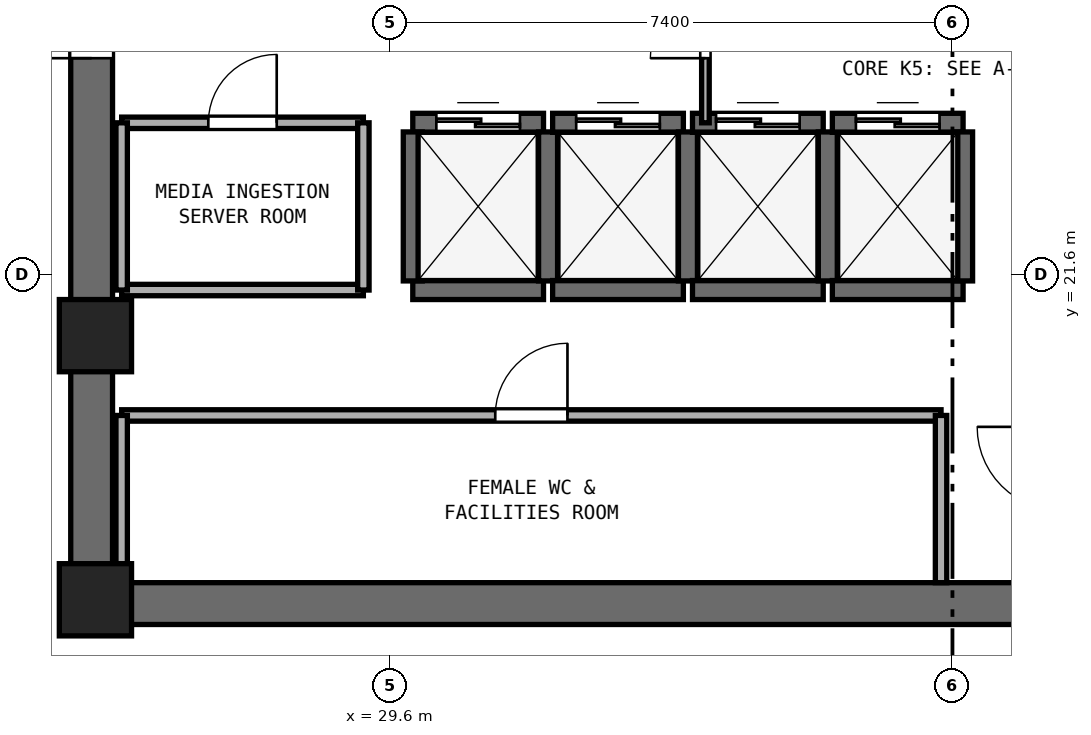
"""IFC4 building model, lengths in metres.
Left out: names, types, materials, properties, quantities, classifications, styles, units other than length and angle.
Written with IfcOpenShell. Run it as: python <this file> out.ifc"""

import sys

from ifc_helpers import new_model, si_unit, direction, frame, frame_2d, origin, origin_2d, place, context, subcontext, project, spatial, rectangle, extrude, element, fill, save


model = new_model("IFC4")
c1 = context("Model", 3, precision=1e-05, world=origin(), true_north=direction((0.0, 1.0)))
c2 = subcontext(c1, "Body", "Model", "MODEL_VIEW")
j1 = project(units=[si_unit("LENGTHUNIT", "METRE"), si_unit("PLANEANGLEUNIT", "RADIAN")], contexts=[c1])
p1 = place(None, origin())
s1 = spatial("IfcSite", under=j1, at=p1, CompositionType="ELEMENT")
p2 = place(p1, origin())
s2 = spatial("IfcBuilding", under=s1, at=p2, CompositionType="ELEMENT")
p3 = place(p2, frame((0.0, 0.0, 151.6)))
s3 = spatial("IfcBuildingStorey", under=s2, at=p3, CompositionType="ELEMENT", Elevation=151.6)
p4 = place(p3, frame((25.4, 17.275, 0.0), z_axis=(0.0, 0.0, 1.0), x_axis=(1.0, 0.0, 0.0)))
e1 = element("IfcWall", 1, at=p4, inside=s3, PredefinedType="SHEAR", context=c2, shape_type="SweptSolid", body=[
    extrude(rectangle(XDim=23.2, YDim=0.55, at=frame_2d((11.6, 0.0))), origin(), (0.0, 0.0, 1.0), 3.54),
])
p5 = place(p3, frame((25.675, 17.55, 0.0), z_axis=(0.0, 0.0, 1.0), x_axis=(0.0, 1.0, 0.0)))
e2 = element("IfcWall", 2, at=p5, inside=s3, PredefinedType="SHEAR", context=c2, shape_type="SweptSolid", body=[
    extrude(rectangle(XDim=15.3, YDim=0.55, at=frame_2d((7.65, 0.0))), origin(), (0.0, 0.0, 1.0), 3.54),
])
p6 = place(p5, frame((6.9, 0.0, 0.0)))
e3 = element("IfcOpeningElement", 3, at=p6, cuts=e2, PredefinedType="OPENING", context=c2, shape_type="SweptSolid", body=[
    extrude(rectangle(XDim=1.5, YDim=2.15, at=frame_2d((0.75, 1.075))), frame((0.0, 0.285, 0.0), z_axis=(0.0, -1.0, 0.0), x_axis=(1.0, 0.0, 0.0)), (0.0, 0.0, 1.0), 0.57),
])
for number, where, z_axis, x_axis in (
    (4, (25.725, 17.325, 0.0), (0.0, 0.0, 1.0), (1.0, 0.0, 0.0)),
    (5, (25.725, 20.8, 0.0), (0.0, 0.0, 1.0), (1.0, 0.0, 0.0)),
):
    element("IfcColumn", number, at=place(p3, frame(where, z_axis=z_axis, x_axis=x_axis)), inside=s3, PredefinedType="PILASTER", context=c2, shape_type="SweptSolid", body=[
        extrude(rectangle(XDim=0.95, YDim=0.95, at=origin_2d()), origin(), (0.0, 0.0, 1.0), 3.8),
    ])
p7 = place(p3, frame((29.9, 21.4, 0.0), z_axis=(0.0, 0.0, 1.0), x_axis=(1.0, 0.0, 0.0)))
e6 = element("IfcWall", 6, at=p7, inside=s3, PredefinedType="SHEAR", context=c2, shape_type="SweptSolid", body=[
    extrude(rectangle(XDim=1.72, YDim=0.25, at=frame_2d((0.86, 0.0))), origin(), (0.0, 0.0, 1.0), 3.54),
])
p8 = place(p3, frame((29.9, 23.6, 0.0), z_axis=(0.0, 0.0, 1.0), x_axis=(1.0, 0.0, 0.0)))
e7 = element("IfcWall", 7, at=p8, inside=s3, PredefinedType="SHEAR", context=c2, shape_type="SweptSolid", body=[
    extrude(rectangle(XDim=1.72, YDim=0.25, at=frame_2d((0.86, 0.0))), origin(), (0.0, 0.0, 1.0), 3.54),
])
p9 = place(p8, frame((0.31, 0.0, 0.0)))
e8 = element("IfcOpeningElement", 8, at=p9, cuts=e7, PredefinedType="OPENING", context=c2, shape_type="SweptSolid", body=[
    extrude(rectangle(XDim=1.1, YDim=2.15, at=frame_2d((0.55, 1.075))), frame((0.0, 0.135, 0.0), z_axis=(0.0, -1.0, 0.0), x_axis=(1.0, 0.0, 0.0)), (0.0, 0.0, 1.0), 0.27),
])
for number, where, z_axis, x_axis in (
    (9, (29.9, 21.52, 0.0), (0.0, 0.0, 1.0), (0.0, 1.0, 0.0)),
    (10, (31.68, 21.52, 0.0), (0.0, 0.0, 1.0), (0.0, 1.0, 0.0)),
):
    element("IfcWall", number, at=place(p3, frame(where, z_axis=z_axis, x_axis=x_axis)), inside=s3, PredefinedType="SHEAR", context=c2, shape_type="SweptSolid", body=[
        extrude(rectangle(XDim=1.96, YDim=0.25, at=frame_2d((0.98, 0.0))), origin(), (0.0, 0.0, 1.0), 3.54),
    ])
p10 = place(p3, frame((31.74, 21.4, 0.0), z_axis=(0.0, 0.0, 1.0), x_axis=(1.0, 0.0, 0.0)))
e11 = element("IfcWall", 11, at=p10, inside=s3, PredefinedType="SHEAR", context=c2, shape_type="SweptSolid", body=[
    extrude(rectangle(XDim=1.72, YDim=0.25, at=frame_2d((0.86, 0.0))), origin(), (0.0, 0.0, 1.0), 3.54),
])
p11 = place(p3, frame((31.74, 23.6, 0.0), z_axis=(0.0, 0.0, 1.0), x_axis=(1.0, 0.0, 0.0)))
e12 = element("IfcWall", 12, at=p11, inside=s3, PredefinedType="SHEAR", context=c2, shape_type="SweptSolid", body=[
    extrude(rectangle(XDim=1.72, YDim=0.25, at=frame_2d((0.86, 0.0))), origin(), (0.0, 0.0, 1.0), 3.54),
])
p12 = place(p11, frame((0.31, 0.0, 0.0)))
e13 = element("IfcOpeningElement", 13, at=p12, cuts=e12, PredefinedType="OPENING", context=c2, shape_type="SweptSolid", body=[
    extrude(rectangle(XDim=1.1, YDim=2.15, at=frame_2d((0.55, 1.075))), frame((0.0, 0.135, 0.0), z_axis=(0.0, -1.0, 0.0), x_axis=(1.0, 0.0, 0.0)), (0.0, 0.0, 1.0), 0.27),
])
p13 = place(p3, frame((33.52, 21.52, 0.0), z_axis=(0.0, 0.0, 1.0), x_axis=(0.0, 1.0, 0.0)))
e14 = element("IfcWall", 14, at=p13, inside=s3, PredefinedType="SHEAR", context=c2, shape_type="SweptSolid", body=[
    extrude(rectangle(XDim=1.96, YDim=0.25, at=frame_2d((0.98, 0.0))), origin(), (0.0, 0.0, 1.0), 3.54),
])
p14 = place(p3, frame((33.58, 21.4, 0.0), z_axis=(0.0, 0.0, 1.0), x_axis=(1.0, 0.0, 0.0)))
e15 = element("IfcWall", 15, at=p14, inside=s3, PredefinedType="SHEAR", context=c2, shape_type="SweptSolid", body=[
    extrude(rectangle(XDim=1.72, YDim=0.25, at=frame_2d((0.86, 0.0))), origin(), (0.0, 0.0, 1.0), 3.54),
])
p15 = place(p3, frame((33.58, 23.6, 0.0), z_axis=(0.0, 0.0, 1.0), x_axis=(1.0, 0.0, 0.0)))
e16 = element("IfcWall", 16, at=p15, inside=s3, PredefinedType="SHEAR", context=c2, shape_type="SweptSolid", body=[
    extrude(rectangle(XDim=1.72, YDim=0.25, at=frame_2d((0.86, 0.0))), origin(), (0.0, 0.0, 1.0), 3.54),
])
p16 = place(p15, frame((0.31, 0.0, 0.0)))
e17 = element("IfcOpeningElement", 17, at=p16, cuts=e16, PredefinedType="OPENING", context=c2, shape_type="SweptSolid", body=[
    extrude(rectangle(XDim=1.1, YDim=2.15, at=frame_2d((0.55, 1.075))), frame((0.0, 0.135, 0.0), z_axis=(0.0, -1.0, 0.0), x_axis=(1.0, 0.0, 0.0)), (0.0, 0.0, 1.0), 0.27),
])
p17 = place(p3, frame((35.36, 21.52, 0.0), z_axis=(0.0, 0.0, 1.0), x_axis=(0.0, 1.0, 0.0)))
e18 = element("IfcWall", 18, at=p17, inside=s3, PredefinedType="SHEAR", context=c2, shape_type="SweptSolid", body=[
    extrude(rectangle(XDim=1.96, YDim=0.25, at=frame_2d((0.98, 0.0))), origin(), (0.0, 0.0, 1.0), 3.54),
])
p18 = place(p3, frame((35.42, 21.4, 0.0), z_axis=(0.0, 0.0, 1.0), x_axis=(1.0, 0.0, 0.0)))
e19 = element("IfcWall", 19, at=p18, inside=s3, PredefinedType="SHEAR", context=c2, shape_type="SweptSolid", body=[
    extrude(rectangle(XDim=1.72, YDim=0.25, at=frame_2d((0.86, 0.0))), origin(), (0.0, 0.0, 1.0), 3.54),
])
p19 = place(p3, frame((35.42, 23.6, 0.0), z_axis=(0.0, 0.0, 1.0), x_axis=(1.0, 0.0, 0.0)))
e20 = element("IfcWall", 20, at=p19, inside=s3, PredefinedType="SHEAR", context=c2, shape_type="SweptSolid", body=[
    extrude(rectangle(XDim=1.72, YDim=0.25, at=frame_2d((0.86, 0.0))), origin(), (0.0, 0.0, 1.0), 3.54),
])
p20 = place(p19, frame((0.31, 0.0, 0.0)))
e21 = element("IfcOpeningElement", 21, at=p20, cuts=e20, PredefinedType="OPENING", context=c2, shape_type="SweptSolid", body=[
    extrude(rectangle(XDim=1.1, YDim=2.15, at=frame_2d((0.55, 1.075))), frame((0.0, 0.135, 0.0), z_axis=(0.0, -1.0, 0.0), x_axis=(1.0, 0.0, 0.0)), (0.0, 0.0, 1.0), 0.27),
])
p21 = place(p3, frame((37.14, 21.52, 0.0), z_axis=(0.0, 0.0, 1.0), x_axis=(0.0, 1.0, 0.0)))
e22 = element("IfcWall", 22, at=p21, inside=s3, PredefinedType="SHEAR", context=c2, shape_type="SweptSolid", body=[
    extrude(rectangle(XDim=1.96, YDim=0.25, at=frame_2d((0.98, 0.0))), origin(), (0.0, 0.0, 1.0), 3.54),
])
p22 = place(p3, frame((26.07, 19.75, 0.0), z_axis=(0.0, 0.0, 1.0), x_axis=(1.0, 0.0, 0.0)))
e23 = element("IfcWall", 23, at=p22, inside=s3, PredefinedType="PARTITIONING", context=c2, shape_type="SweptSolid", body=[
    extrude(rectangle(XDim=10.78, YDim=0.15, at=frame_2d((5.39, 0.0))), origin(), (0.0, 0.0, 1.0), 3.54),
])
p23 = place(p22, frame((4.915, 0.0, 0.0)))
e24 = element("IfcOpeningElement", 24, at=p23, cuts=e23, PredefinedType="OPENING", context=c2, shape_type="SweptSolid", body=[
    extrude(rectangle(XDim=0.95, YDim=2.1, at=frame_2d((0.475, 1.05))), frame((0.0, 0.085, 0.0), z_axis=(0.0, -1.0, 0.0), x_axis=(1.0, 0.0, 0.0)), (0.0, 0.0, 1.0), 0.17),
])
p24 = place(p3, frame((26.07, 17.55, 0.0), z_axis=(0.0, 0.0, 1.0), x_axis=(0.0, 1.0, 0.0)))
e25 = element("IfcWall", 25, at=p24, inside=s3, PredefinedType="PARTITIONING", context=c2, shape_type="SweptSolid", body=[
    extrude(rectangle(XDim=2.2, YDim=0.15, at=frame_2d((1.1, 0.0))), origin(), (0.0, 0.0, 1.0), 2.64),
])
p25 = place(p3, frame((36.85, 17.55, 0.0), z_axis=(0.0, 0.0, 1.0), x_axis=(0.0, 1.0, 0.0)))
e26 = element("IfcWall", 26, at=p25, inside=s3, PredefinedType="PARTITIONING", context=c2, shape_type="SweptSolid", body=[
    extrude(rectangle(XDim=2.2, YDim=0.15, at=frame_2d((1.1, 0.0))), origin(), (0.0, 0.0, 1.0), 3.54),
])
p26 = place(p3, frame((26.07, 21.4, 0.0), z_axis=(0.0, 0.0, 1.0), x_axis=(1.0, 0.0, 0.0)))
e27 = element("IfcWall", 27, at=p26, inside=s3, PredefinedType="PARTITIONING", context=c2, shape_type="SweptSolid", body=[
    extrude(rectangle(XDim=3.18, YDim=0.15, at=frame_2d((1.59, 0.0))), origin(), (0.0, 0.0, 1.0), 3.54),
])
p27 = place(p3, frame((26.07, 23.6, 0.0), z_axis=(0.0, 0.0, 1.0), x_axis=(1.0, 0.0, 0.0)))
e28 = element("IfcWall", 28, at=p27, inside=s3, PredefinedType="PARTITIONING", context=c2, shape_type="SweptSolid", body=[
    extrude(rectangle(XDim=3.18, YDim=0.15, at=frame_2d((1.59, 0.0))), origin(), (0.0, 0.0, 1.0), 3.54),
])
p28 = place(p27, frame((1.14, 0.0, 0.0)))
e29 = element("IfcOpeningElement", 29, at=p28, cuts=e28, PredefinedType="OPENING", context=c2, shape_type="SweptSolid", body=[
    extrude(rectangle(XDim=0.9, YDim=2.1, at=frame_2d((0.45, 1.05))), frame((0.0, 0.085, 0.0), z_axis=(0.0, -1.0, 0.0), x_axis=(1.0, 0.0, 0.0)), (0.0, 0.0, 1.0), 0.17),
])
p29 = place(p3, frame((26.07, 21.4, 0.0), z_axis=(0.0, 0.0, 1.0), x_axis=(0.0, 1.0, 0.0)))
e30 = element("IfcWall", 30, at=p29, inside=s3, PredefinedType="PARTITIONING", context=c2, shape_type="SweptSolid", body=[
    extrude(rectangle(XDim=2.2, YDim=0.15, at=frame_2d((1.1, 0.0))), origin(), (0.0, 0.0, 1.0), 2.64),
])
p30 = place(p3, frame((29.25, 21.4, 0.0), z_axis=(0.0, 0.0, 1.0), x_axis=(0.0, 1.0, 0.0)))
e31 = element("IfcWall", 31, at=p30, inside=s3, PredefinedType="PARTITIONING", context=c2, shape_type="SweptSolid", body=[
    extrude(rectangle(XDim=2.2, YDim=0.15, at=frame_2d((1.1, 0.0))), origin(), (0.0, 0.0, 1.0), 3.54),
])
p31 = place(p3, frame((33.75, 23.6, 0.0), z_axis=(0.0, 0.0, 1.0), x_axis=(0.0, 1.0, 0.0)))
e32 = element("IfcWall", 32, at=p31, inside=s3, PredefinedType="PARTITIONING", context=c2, shape_type="SweptSolid", body=[
    extrude(rectangle(XDim=3.2, YDim=0.1, at=frame_2d((1.6, 0.0))), origin(), (0.0, 0.0, 1.0), 3.54),
])
p32 = place(p31, frame((0.85, 0.0, 0.0)))
e33 = element("IfcOpeningElement", 33, at=p32, cuts=e32, PredefinedType="OPENING", context=c2, shape_type="SweptSolid", body=[
    extrude(rectangle(XDim=1.45, YDim=2.12, at=frame_2d((0.725, 1.06))), frame((0.0, 0.06, 0.0), z_axis=(0.0, -1.0, 0.0), x_axis=(1.0, 0.0, 0.0)), (0.0, 0.0, 1.0), 0.12),
])
p33 = place(p9, origin())
e34 = element("IfcDoor", 34, at=p33, inside=s3, OperationType="DOUBLE_DOOR_SLIDING", PredefinedType="DOOR", context=c2, shape_type="SweptSolid", body=[
    extrude(rectangle(XDim=1.1, YDim=2.15, at=frame_2d((0.55, 1.075))), frame((0.0, 0.025, 0.0), z_axis=(0.0, -1.0, 0.0), x_axis=(1.0, 0.0, 0.0)), (0.0, 0.0, 1.0), 0.05),
])
fill(e8, e34)
p34 = place(p12, origin())
e35 = element("IfcDoor", 35, at=p34, inside=s3, OperationType="DOUBLE_DOOR_SLIDING", PredefinedType="DOOR", context=c2, shape_type="SweptSolid", body=[
    extrude(rectangle(XDim=1.1, YDim=2.15, at=frame_2d((0.55, 1.075))), frame((0.0, 0.025, 0.0), z_axis=(0.0, -1.0, 0.0), x_axis=(1.0, 0.0, 0.0)), (0.0, 0.0, 1.0), 0.05),
])
fill(e13, e35)
p35 = place(p16, origin())
e36 = element("IfcDoor", 36, at=p35, inside=s3, OperationType="DOUBLE_DOOR_SLIDING", PredefinedType="DOOR", context=c2, shape_type="SweptSolid", body=[
    extrude(rectangle(XDim=1.1, YDim=2.15, at=frame_2d((0.55, 1.075))), frame((0.0, 0.025, 0.0), z_axis=(0.0, -1.0, 0.0), x_axis=(1.0, 0.0, 0.0)), (0.0, 0.0, 1.0), 0.05),
])
fill(e17, e36)
p36 = place(p20, origin())
e37 = element("IfcDoor", 37, at=p36, inside=s3, OperationType="DOUBLE_DOOR_SLIDING", PredefinedType="DOOR", context=c2, shape_type="SweptSolid", body=[
    extrude(rectangle(XDim=1.1, YDim=2.15, at=frame_2d((0.55, 1.075))), frame((0.0, 0.025, 0.0), z_axis=(0.0, -1.0, 0.0), x_axis=(1.0, 0.0, 0.0)), (0.0, 0.0, 1.0), 0.05),
])
fill(e21, e37)
p37 = place(p6, origin())
e38 = element("IfcDoor", 38, at=p37, inside=s3, OperationType="DOUBLE_DOOR_SINGLE_SWING", PredefinedType="DOOR", context=c2, shape_type="SweptSolid", body=[
    extrude(rectangle(XDim=1.5, YDim=2.15, at=frame_2d((0.75, 1.075))), frame((0.0, 0.025, 0.0), z_axis=(0.0, -1.0, 0.0), x_axis=(1.0, 0.0, 0.0)), (0.0, 0.0, 1.0), 0.05),
])
fill(e3, e38)
p38 = place(p23, origin())
e39 = element("IfcDoor", 39, at=p38, inside=s3, OperationType="SINGLE_SWING_RIGHT", PredefinedType="DOOR", context=c2, shape_type="SweptSolid", body=[
    extrude(rectangle(XDim=0.95, YDim=2.1, at=frame_2d((0.475, 1.05))), frame((0.0, 0.025, 0.0), z_axis=(0.0, -1.0, 0.0), x_axis=(1.0, 0.0, 0.0)), (0.0, 0.0, 1.0), 0.05),
])
fill(e24, e39)
p39 = place(p28, origin())
e40 = element("IfcDoor", 40, at=p39, inside=s3, OperationType="SINGLE_SWING_RIGHT", PredefinedType="DOOR", context=c2, shape_type="SweptSolid", body=[
    extrude(rectangle(XDim=0.9, YDim=2.1, at=frame_2d((0.45, 1.05))), frame((0.0, 0.025, 0.0), z_axis=(0.0, -1.0, 0.0), x_axis=(1.0, 0.0, 0.0)), (0.0, 0.0, 1.0), 0.05),
])
fill(e29, e40)
p40 = place(p32, origin())
e41 = element("IfcDoor", 41, at=p40, inside=s3, OperationType="DOUBLE_DOOR_SINGLE_SWING", PredefinedType="DOOR", context=c2, shape_type="SweptSolid", body=[
    extrude(rectangle(XDim=1.45, YDim=2.12, at=frame_2d((0.725, 1.06))), frame((0.0, 0.025, 0.0), z_axis=(0.0, -1.0, 0.0), x_axis=(1.0, 0.0, 0.0)), (0.0, 0.0, 1.0), 0.05),
])
fill(e33, e41)
save(model, sys.argv[1])
